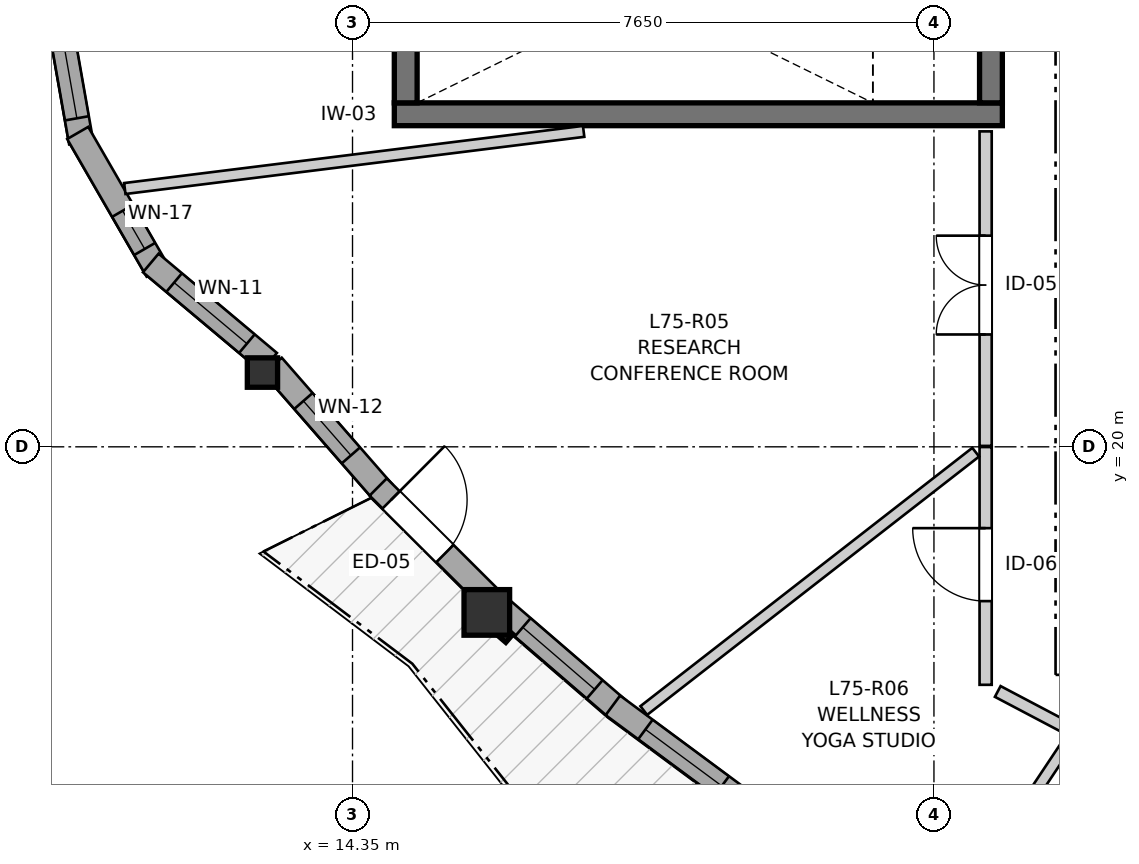
"""IFC4 building model, lengths in metres.
Left out: names, types, materials, properties, quantities, classifications, styles, units other than length and angle.
Written with IfcOpenShell. Run it as: python <this file> out.ifc"""

import sys

from ifc_helpers import new_model, si_unit, direction, frame, frame_2d, origin, origin_2d, place, context, subcontext, project, spatial, rectangle, i_section, extrude, source, transform, mapped, element, fill, save


model = new_model("IFC4")
c1 = context("Model", 3, precision=1e-05, world=origin(), true_north=direction((0.0, 1.0)))
c2 = subcontext(c1, "Body", "Model", "MODEL_VIEW")
j1 = project(units=[si_unit("LENGTHUNIT", "METRE"), si_unit("PLANEANGLEUNIT", "RADIAN")], contexts=[c1])
p1 = place(None, origin())
s1 = spatial("IfcSite", under=j1, at=p1, CompositionType="ELEMENT")
p2 = place(p1, origin())
s2 = spatial("IfcBuilding", under=s1, at=p2, CompositionType="ELEMENT")
p3 = place(p2, frame((0.0, 0.0, 250.0)))
s3 = spatial("IfcBuildingStorey", under=s2, at=p3, CompositionType="ELEMENT", Elevation=250.0)
p4 = place(p3, frame((14.9, 24.375, 0.0), z_axis=(0.0, 0.0, 1.0), x_axis=(1.0, 0.0, 0.0)))
e1 = element("IfcWall", 1, at=p4, inside=s3, PredefinedType="SHEAR", context=c2, shape_type="SweptSolid", body=[
    extrude(rectangle(XDim=8.0, YDim=0.3, at=frame_2d((4.0, 0.0))), origin(), (0.0, 0.0, 1.0), 2.95),
])
p5 = place(p3, frame((15.05, 27.475, 0.0), z_axis=(0.0, 0.0, 1.0), x_axis=(0.0, -1.0, 0.0)))
e2 = element("IfcWall", 2, at=p5, inside=s3, PredefinedType="SHEAR", context=c2, shape_type="SweptSolid", body=[
    extrude(rectangle(XDim=2.95, YDim=0.3, at=frame_2d((1.475, 0.0))), origin(), (0.0, 0.0, 1.0), 2.95),
])
p6 = place(p3, frame((22.75, 24.525, 0.0), z_axis=(0.0, 0.0, 1.0), x_axis=(0.0, 1.0, 0.0)))
e3 = element("IfcWall", 3, at=p6, inside=s3, PredefinedType="SHEAR", context=c2, shape_type="SweptSolid", body=[
    extrude(rectangle(XDim=2.95, YDim=0.3, at=frame_2d((1.475, 0.0))), origin(), (0.0, 0.0, 1.0), 2.95),
])
p7 = place(p6, frame((0.985, 0.0, 0.0)))
e4 = element("IfcOpeningElement", 4, at=p7, cuts=e3, PredefinedType="OPENING", context=c2, shape_type="SweptSolid", body=[
    extrude(rectangle(XDim=0.98, YDim=2.15, at=frame_2d((0.49, 1.075))), frame((0.0, 0.16, 0.0), z_axis=(0.0, -1.0, 0.0), x_axis=(1.0, 0.0, 0.0)), (0.0, 0.0, 1.0), 0.32),
])
m1 = source(origin(), c2, "Body", "SweptSolid", [
    extrude(i_section(OverallWidth=0.398, OverallDepth=0.387, WebThickness=0.019, FlangeThickness=0.03, FilletRadius=0.015, at=origin_2d()), origin(), (0.0, 0.0, 1.0), 2.95),
])
p8 = place(p3, frame((13.165, 20.977, 0.0), z_axis=(0.0, 0.0, 1.0), x_axis=(1.0, 0.0, 0.0)))
e5 = element("IfcColumn", 5, at=p8, inside=s3, PredefinedType="PILASTER", context=c2, shape_type="MappedRepresentation", body=[
    mapped(m1, transform((0.0, 0.0, 0.0), x_axis=(1.0, 0.0, 0.0), y_axis=(0.0, 1.0, 0.0), z_axis=(0.0, 0.0, 1.0), scale=1.0)),
])
m2 = source(origin(), c2, "Body", "SweptSolid", [
    extrude(rectangle(XDim=0.6, YDim=0.6, at=origin_2d()), origin(), (0.0, 0.0, 1.0), 2.95),
])
p9 = place(p3, frame((16.117, 17.821, 0.0), z_axis=(0.0, 0.0, 1.0), x_axis=(1.0, 0.0, 0.0)))
e6 = element("IfcColumn", 6, at=p9, inside=s3, PredefinedType="COLUMN", context=c2, shape_type="MappedRepresentation", body=[
    mapped(m2, transform((0.0, 0.0, 0.0), x_axis=(1.0, 0.0, 0.0), y_axis=(0.0, 1.0, 0.0), z_axis=(0.0, 0.0, 1.0), scale=1.0)),
])
p10 = place(p3, frame((10.416, 26.065, 0.0), z_axis=(0.0, 0.0, 1.0), x_axis=(0.173672066494, -0.984803540469, 0.0)))
e7 = element("IfcWall", 7, at=p10, inside=s3, PredefinedType="SOLIDWALL", context=c2, shape_type="SweptSolid", body=[
    extrude(rectangle(XDim=2.09, YDim=0.32, at=frame_2d((1.045, 0.0))), origin(), (0.0, 0.0, 1.0), 2.57),
])
p11 = place(p10, frame((0.32, 0.0, 0.82)))
e8 = element("IfcOpeningElement", 8, at=p11, cuts=e7, PredefinedType="OPENING", context=c2, shape_type="SweptSolid", body=[
    extrude(rectangle(XDim=1.45, YDim=1.25, at=frame_2d((0.725, 0.625))), frame((0.0, 0.17, 0.0), z_axis=(0.0, -1.0, 0.0), x_axis=(1.0, 0.0, 0.0)), (0.0, 0.0, 1.0), 0.34),
])
p12 = place(p3, frame((10.734, 24.129, 0.0), z_axis=(0.0, 0.0, 1.0), x_axis=(0.499995423472, -0.866028046028, 0.0)))
e9 = element("IfcWall", 9, at=p12, inside=s3, PredefinedType="SOLIDWALL", context=c2, shape_type="SweptSolid", body=[
    extrude(rectangle(XDim=2.09, YDim=0.32, at=frame_2d((1.045, 0.0))), origin(), (0.0, 0.0, 1.0), 2.57),
])
p13 = place(p12, frame((1.182, 0.0, 0.82)))
e10 = element("IfcOpeningElement", 10, at=p13, cuts=e9, PredefinedType="OPENING", context=c2, shape_type="SweptSolid", body=[
    extrude(rectangle(XDim=0.58, YDim=1.35, at=frame_2d((0.29, 0.675))), frame((0.0, 0.17, 0.0), z_axis=(0.0, -1.0, 0.0), x_axis=(1.0, 0.0, 0.0)), (0.0, 0.0, 1.0), 0.34),
])
p14 = place(p3, frame((11.696, 22.419, 0.0), z_axis=(0.0, 0.0, 1.0), x_axis=(0.766099948115, -0.642721455608, 0.0)))
e11 = element("IfcWall", 11, at=p14, inside=s3, PredefinedType="SOLIDWALL", context=c2, shape_type="SweptSolid", body=[
    extrude(rectangle(XDim=2.032, YDim=0.32, at=frame_2d((1.016, 0.0))), origin(), (0.0, 0.0, 1.0), 2.57),
])
p15 = place(p14, frame((0.401, 0.0, 0.82)))
e12 = element("IfcOpeningElement", 12, at=p15, cuts=e11, PredefinedType="OPENING", context=c2, shape_type="SweptSolid", body=[
    extrude(rectangle(XDim=1.25, YDim=1.35, at=frame_2d((0.625, 0.675))), frame((0.0, 0.17, 0.0), z_axis=(0.0, -1.0, 0.0), x_axis=(1.0, 0.0, 0.0)), (0.0, 0.0, 1.0), 0.34),
])
p16 = place(p3, frame((13.299, 21.067, 0.0), z_axis=(0.0, 0.0, 1.0), x_axis=(0.657609731914, -0.753358772759, 0.0)))
e13 = element("IfcWall", 13, at=p16, inside=s3, PredefinedType="SOLIDWALL", context=c2, shape_type="SweptSolid", body=[
    extrude(rectangle(XDim=2.203, YDim=0.32, at=frame_2d((1.102, 0.0))), origin(), (0.0, 0.0, 1.0), 2.57),
])
p17 = place(p16, frame((0.616, 0.0, 0.82)))
e14 = element("IfcOpeningElement", 14, at=p17, cuts=e13, PredefinedType="OPENING", context=c2, shape_type="SweptSolid", body=[
    extrude(rectangle(XDim=0.95, YDim=1.35, at=frame_2d((0.475, 0.675))), frame((0.0, 0.17, 0.0), z_axis=(0.0, -1.0, 0.0), x_axis=(1.0, 0.0, 0.0)), (0.0, 0.0, 1.0), 0.34),
])
p18 = place(p3, frame((14.688, 19.471, 0.0), z_axis=(0.0, 0.0, 1.0), x_axis=(0.708392320445, -0.705818900522, 0.0)))
e15 = element("IfcWall", 15, at=p18, inside=s3, PredefinedType="SOLIDWALL", context=c2, shape_type="SweptSolid", body=[
    extrude(rectangle(XDim=2.087, YDim=0.32, at=frame_2d((1.043, 0.0))), origin(), (0.0, 0.0, 1.0), 2.57),
])
p19 = place(p18, frame((0.24, 0.0, 0.0)))
e16 = element("IfcOpeningElement", 16, at=p19, cuts=e15, PredefinedType="OPENING", context=c2, shape_type="SweptSolid", body=[
    extrude(rectangle(XDim=1.0, YDim=2.1, at=frame_2d((0.5, 1.05))), frame((0.0, 0.17, 0.0), z_axis=(0.0, -1.0, 0.0), x_axis=(1.0, 0.0, 0.0)), (0.0, 0.0, 1.0), 0.34),
])
p20 = place(p3, frame((16.29, 17.884, 0.0), z_axis=(0.0, 0.0, 1.0), x_axis=(0.757405903716, -0.652944329186, 0.0)))
e17 = element("IfcWall", 17, at=p20, inside=s3, PredefinedType="SOLIDWALL", context=c2, shape_type="SweptSolid", body=[
    extrude(rectangle(XDim=2.052, YDim=0.32, at=frame_2d((1.026, 0.0))), origin(), (0.0, 0.0, 1.0), 2.57),
])
p21 = place(p20, frame((0.396, 0.0, 0.82)))
e18 = element("IfcOpeningElement", 18, at=p21, cuts=e17, PredefinedType="OPENING", context=c2, shape_type="SweptSolid", body=[
    extrude(rectangle(XDim=1.25, YDim=1.35, at=frame_2d((0.625, 0.675))), frame((0.0, 0.17, 0.0), z_axis=(0.0, -1.0, 0.0), x_axis=(1.0, 0.0, 0.0)), (0.0, 0.0, 1.0), 0.34),
])
p22 = place(p3, frame((17.775, 16.599, 0.0), z_axis=(0.0, 0.0, 1.0), x_axis=(0.803808524664, -0.594888103493, 0.0)))
e19 = element("IfcWall", 19, at=p22, inside=s3, PredefinedType="SOLIDWALL", context=c2, shape_type="SweptSolid", body=[
    extrude(rectangle(XDim=2.099, YDim=0.32, at=frame_2d((1.049, 0.0))), origin(), (0.0, 0.0, 1.0), 2.57),
])
p23 = place(p22, frame((0.533, 0.0, 0.82)))
e20 = element("IfcOpeningElement", 20, at=p23, cuts=e19, PredefinedType="OPENING", context=c2, shape_type="SweptSolid", body=[
    extrude(rectangle(XDim=1.25, YDim=1.35, at=frame_2d((0.625, 0.675))), frame((0.0, 0.17, 0.0), z_axis=(0.0, -1.0, 0.0), x_axis=(1.0, 0.0, 0.0)), (0.0, 0.0, 1.0), 0.34),
])
p24 = place(p3, frame((22.68, 20.012, 0.0), z_axis=(0.0, 0.0, 1.0), x_axis=(0.0, 1.0, 0.0)))
e21 = element("IfcWall", 21, at=p24, inside=s3, PredefinedType="PARTITIONING", context=c2, shape_type="SweptSolid", body=[
    extrude(rectangle(XDim=4.138, YDim=0.16, at=frame_2d((2.069, 0.0))), origin(), (0.0, 0.0, 1.0), 2.218),
])
p25 = place(p24, frame((1.466, 0.0, 0.0)))
e22 = element("IfcOpeningElement", 22, at=p25, cuts=e21, PredefinedType="OPENING", context=c2, shape_type="SweptSolid", body=[
    extrude(rectangle(XDim=1.3, YDim=2.1, at=frame_2d((0.65, 1.05))), frame((0.0, 0.09, 0.0), z_axis=(0.0, -1.0, 0.0), x_axis=(1.0, 0.0, 0.0)), (0.0, 0.0, 1.0), 0.18),
])
p26 = place(p3, frame((22.68, 16.869, 0.0), z_axis=(0.0, 0.0, 1.0), x_axis=(0.0, 1.0, 0.0)))
e23 = element("IfcWall", 23, at=p26, inside=s3, PredefinedType="PARTITIONING", context=c2, shape_type="SweptSolid", body=[
    extrude(rectangle(XDim=3.128, YDim=0.16, at=frame_2d((1.564, 0.0))), origin(), (0.0, 0.0, 1.0), 2.95),
])
p27 = place(p26, frame((1.101, 0.0, 0.0)))
e24 = element("IfcOpeningElement", 24, at=p27, cuts=e23, PredefinedType="OPENING", context=c2, shape_type="SweptSolid", body=[
    extrude(rectangle(XDim=0.96, YDim=2.1, at=frame_2d((0.48, 1.05))), frame((0.0, 0.09, 0.0), z_axis=(0.0, -1.0, 0.0), x_axis=(1.0, 0.0, 0.0)), (0.0, 0.0, 1.0), 0.18),
])
p28 = place(p3, frame((11.354, 23.398, 0.0), z_axis=(0.0, 0.0, 1.0), x_axis=(0.992337032495, 0.123560567901, 0.0)))
e25 = element("IfcWall", 25, at=p28, inside=s3, PredefinedType="PARTITIONING", context=c2, shape_type="SweptSolid", body=[
    extrude(rectangle(XDim=6.084, YDim=0.145, at=frame_2d((3.042, 0.0))), origin(), (0.0, 0.0, 1.0), 2.95),
])
p29 = place(p3, frame((18.182, 16.531, 0.0), z_axis=(0.0, 0.0, 1.0), x_axis=(0.789162127136, 0.614184937209, 0.0)))
e26 = element("IfcWall", 26, at=p29, inside=s3, PredefinedType="PARTITIONING", context=c2, shape_type="SweptSolid", body=[
    extrude(rectangle(XDim=5.534, YDim=0.145, at=frame_2d((2.767, 0.0))), origin(), (0.0, 0.0, 1.0), 2.95),
])
p30 = place(p3, frame((22.281, 13.882, 0.0), z_axis=(0.0, 0.0, 1.0), x_axis=(0.554204156683, 0.832380773874, 0.0)))
e27 = element("IfcWall", 27, at=p30, inside=s3, PredefinedType="PARTITIONING", context=c2, shape_type="SweptSolid", body=[
    extrude(rectangle(XDim=2.84, YDim=0.145, at=frame_2d((1.42, 0.0))), origin(), (0.0, 0.0, 1.0), 2.95),
])
p31 = place(p3, frame((22.839, 16.781, 0.0), z_axis=(0.0, 0.0, 1.0), x_axis=(0.884533287542, -0.466477076853, 0.0)))
e28 = element("IfcWall", 28, at=p31, inside=s3, PredefinedType="PARTITIONING", context=c2, shape_type="SweptSolid", body=[
    extrude(rectangle(XDim=1.074, YDim=0.16, at=frame_2d((0.537, 0.0))), origin(), (0.0, 0.0, 1.0), 2.95),
])
m3 = source(origin(), c2, "Body", "SweptSolid", [
    extrude(rectangle(XDim=1.45, YDim=1.25, at=frame_2d((0.725, 0.625))), frame((0.0, 0.03, 0.0), z_axis=(0.0, -1.0, 0.0), x_axis=(1.0, 0.0, 0.0)), (0.0, 0.0, 1.0), 0.06),
])
p32 = place(p11, origin())
e29 = element("IfcWindow", 29, at=p32, inside=s3, PartitioningType="SINGLE_PANEL", PredefinedType="WINDOW", context=c2, shape_type="MappedRepresentation", body=[
    mapped(m3, transform((0.0, 0.0, 0.0), x_axis=(1.0, 0.0, 0.0), y_axis=(0.0, 1.0, 0.0), z_axis=(0.0, 0.0, 1.0), scale=1.0)),
])
fill(e8, e29)
m4 = source(origin(), c2, "Body", "SweptSolid", [
    extrude(rectangle(XDim=0.58, YDim=1.35, at=frame_2d((0.29, 0.675))), frame((0.0, 0.03, 0.0), z_axis=(0.0, -1.0, 0.0), x_axis=(1.0, 0.0, 0.0)), (0.0, 0.0, 1.0), 0.06),
])
p33 = place(p13, origin())
e30 = element("IfcWindow", 30, at=p33, inside=s3, PartitioningType="SINGLE_PANEL", PredefinedType="WINDOW", context=c2, shape_type="MappedRepresentation", body=[
    mapped(m4, transform((0.0, 0.0, 0.0), x_axis=(1.0, 0.0, 0.0), y_axis=(0.0, 1.0, 0.0), z_axis=(0.0, 0.0, 1.0), scale=1.0)),
])
fill(e10, e30)
m5 = source(origin(), c2, "Body", "SweptSolid", [
    extrude(rectangle(XDim=1.25, YDim=1.35, at=frame_2d((0.625, 0.675))), frame((0.0, 0.03, 0.0), z_axis=(0.0, -1.0, 0.0), x_axis=(1.0, 0.0, 0.0)), (0.0, 0.0, 1.0), 0.06),
])
p34 = place(p15, origin())
e31 = element("IfcWindow", 31, at=p34, inside=s3, PartitioningType="SINGLE_PANEL", PredefinedType="WINDOW", context=c2, shape_type="MappedRepresentation", body=[
    mapped(m5, transform((0.0, 0.0, 0.0), x_axis=(1.0, 0.0, 0.0), y_axis=(0.0, 1.0, 0.0), z_axis=(0.0, 0.0, 1.0), scale=1.0)),
])
fill(e12, e31)
m6 = source(origin(), c2, "Body", "SweptSolid", [
    extrude(rectangle(XDim=0.95, YDim=1.35, at=frame_2d((0.475, 0.675))), frame((0.0, 0.03, 0.0), z_axis=(0.0, -1.0, 0.0), x_axis=(1.0, 0.0, 0.0)), (0.0, 0.0, 1.0), 0.06),
])
p35 = place(p17, origin())
e32 = element("IfcWindow", 32, at=p35, inside=s3, PartitioningType="SINGLE_PANEL", PredefinedType="WINDOW", context=c2, shape_type="MappedRepresentation", body=[
    mapped(m6, transform((0.0, 0.0, 0.0), x_axis=(1.0, 0.0, 0.0), y_axis=(0.0, 1.0, 0.0), z_axis=(0.0, 0.0, 1.0), scale=1.0)),
])
fill(e14, e32)
p36 = place(p21, origin())
e33 = element("IfcWindow", 33, at=p36, inside=s3, PartitioningType="SINGLE_PANEL", PredefinedType="WINDOW", context=c2, shape_type="MappedRepresentation", body=[
    mapped(m5, transform((0.0, 0.0, 0.0), x_axis=(1.0, 0.0, 0.0), y_axis=(0.0, 1.0, 0.0), z_axis=(0.0, 0.0, 1.0), scale=1.0)),
])
fill(e18, e33)
p37 = place(p23, origin())
e34 = element("IfcWindow", 34, at=p37, inside=s3, PartitioningType="SINGLE_PANEL", PredefinedType="WINDOW", context=c2, shape_type="MappedRepresentation", body=[
    mapped(m5, transform((0.0, 0.0, 0.0), x_axis=(1.0, 0.0, 0.0), y_axis=(0.0, 1.0, 0.0), z_axis=(0.0, 0.0, 1.0), scale=1.0)),
])
fill(e20, e34)
m7 = source(origin(), c2, "Body", "SweptSolid", [
    extrude(rectangle(XDim=1.0, YDim=2.1, at=frame_2d((0.5, 1.05))), frame((0.0, 0.025, 0.0), z_axis=(0.0, -1.0, 0.0), x_axis=(1.0, 0.0, 0.0)), (0.0, 0.0, 1.0), 0.05),
])
p38 = place(p19, origin())
e35 = element("IfcDoor", 35, at=p38, inside=s3, OperationType="SINGLE_SWING_LEFT", PredefinedType="DOOR", context=c2, shape_type="MappedRepresentation", body=[
    mapped(m7, transform((0.0, 0.0, 0.0), x_axis=(1.0, 0.0, 0.0), y_axis=(0.0, 1.0, 0.0), z_axis=(0.0, 0.0, 1.0), scale=1.0)),
])
fill(e16, e35)
m8 = source(origin(), c2, "Body", "SweptSolid", [
    extrude(rectangle(XDim=1.3, YDim=2.1, at=frame_2d((0.65, 1.05))), frame((0.0, 0.025, 0.0), z_axis=(0.0, -1.0, 0.0), x_axis=(1.0, 0.0, 0.0)), (0.0, 0.0, 1.0), 0.05),
])
p39 = place(p25, origin())
e36 = element("IfcDoor", 36, at=p39, inside=s3, OperationType="DOUBLE_DOOR_SINGLE_SWING", PredefinedType="DOOR", context=c2, shape_type="MappedRepresentation", body=[
    mapped(m8, transform((0.0, 0.0, 0.0), x_axis=(1.0, 0.0, 0.0), y_axis=(0.0, 1.0, 0.0), z_axis=(0.0, 0.0, 1.0), scale=1.0)),
])
fill(e22, e36)
m9 = source(origin(), c2, "Body", "SweptSolid", [
    extrude(rectangle(XDim=0.96, YDim=2.1, at=frame_2d((0.48, 1.05))), frame((0.0, 0.025, 0.0), z_axis=(0.0, -1.0, 0.0), x_axis=(1.0, 0.0, 0.0)), (0.0, 0.0, 1.0), 0.05),
])
p40 = place(p27, origin())
e37 = element("IfcDoor", 37, at=p40, inside=s3, OperationType="SINGLE_SWING_RIGHT", PredefinedType="DOOR", context=c2, shape_type="MappedRepresentation", body=[
    mapped(m9, transform((0.0, 0.0, 0.0), x_axis=(1.0, 0.0, 0.0), y_axis=(0.0, 1.0, 0.0), z_axis=(0.0, 0.0, 1.0), scale=1.0)),
])
fill(e24, e37)
save(model, sys.argv[1])
